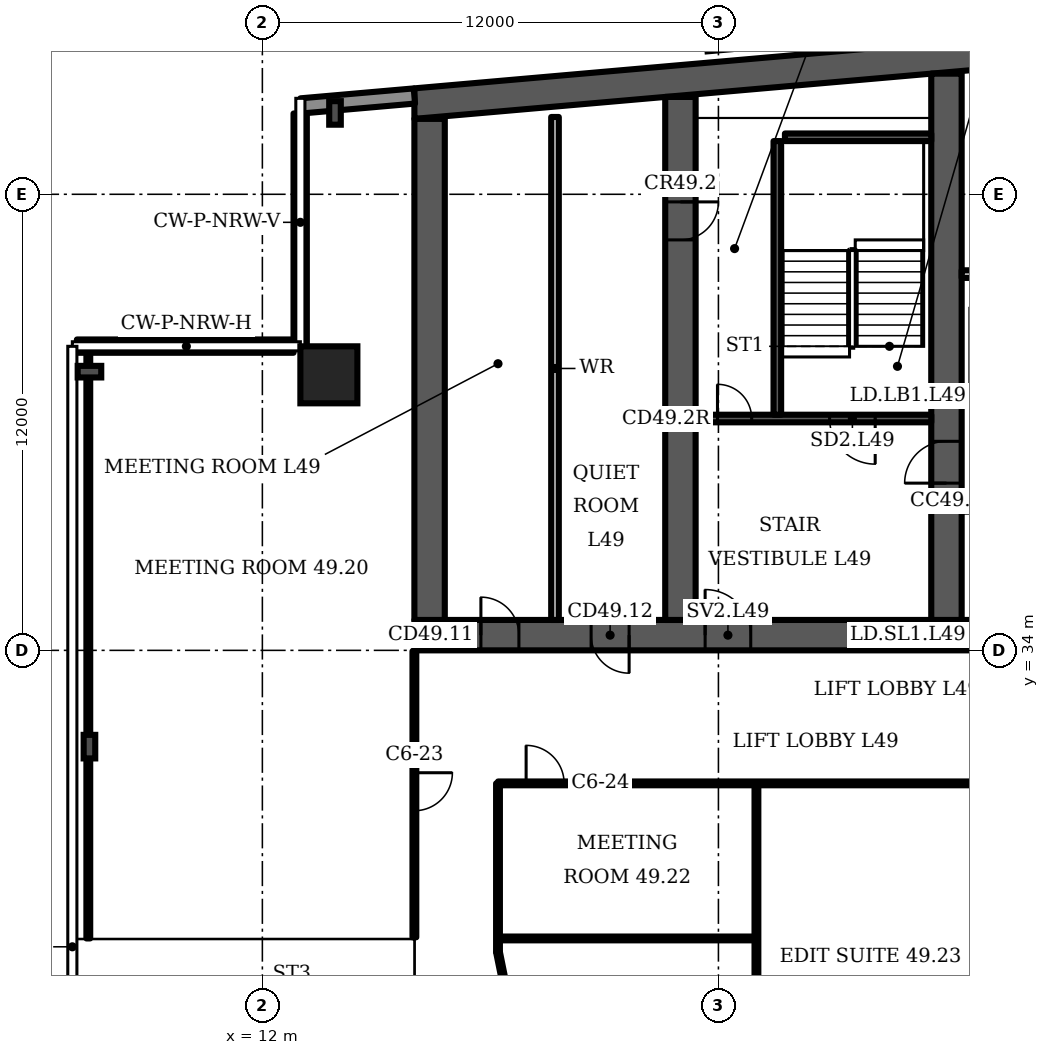
"""IFC4 building model, lengths in metres.
Left out: names, types, materials, properties, quantities, classifications, styles, units other than length and angle.
Written with IfcOpenShell. Run it as: python <this file> out.ifc"""

import sys

from ifc_helpers import new_model, si_unit, direction, frame, frame_2d, origin, origin_2d, place, context, subcontext, project, spatial, polyline, rectangle, i_section, outline, extrude, element, fill, save


model = new_model("IFC4")
c1 = context("Model", 3, precision=1e-05, world=origin(), true_north=direction((0.0, 1.0)))
c2 = subcontext(c1, "Body", "Model", "MODEL_VIEW")
j1 = project(units=[si_unit("LENGTHUNIT", "METRE"), si_unit("PLANEANGLEUNIT", "RADIAN")], contexts=[c1])
p1 = place(None, origin())
s1 = spatial("IfcSite", under=j1, at=p1, CompositionType="ELEMENT")
p2 = place(p1, origin())
s2 = spatial("IfcBuilding", under=s1, at=p2, CompositionType="ELEMENT")
p3 = place(p2, frame((0.0, 0.0, 198.7)))
s3 = spatial("IfcBuildingStorey", under=s2, at=p3, CompositionType="ELEMENT", Elevation=198.7)
p4 = place(p3, origin())
e1 = element("IfcWall", 1, at=p4, inside=s3, PredefinedType="SHEAR", context=c2, shape_type="SweptSolid", body=[
    extrude(outline(polyline([(16.0, 47.984), (37.0, 49.822), (58.0, 47.984), (58.0, 48.787), (37.0, 50.625), (16.0, 48.787), (16.0, 47.984)])), origin(), (0.0, 0.0, 1.0), 3.6),
])
p5 = place(p3, frame((16.0, 34.4, 0.0), z_axis=(0.0, 0.0, 1.0), x_axis=(1.0, 0.0, 0.0)))
e2 = element("IfcWall", 2, at=p5, inside=s3, PredefinedType="SHEAR", context=c2, shape_type="SweptSolid", body=[
    extrude(rectangle(XDim=42.0, YDim=0.8, at=frame_2d((21.0, 0.0))), origin(), (0.0, 0.0, 1.0), 3.6),
])
p6 = place(p5, frame((1.75, 0.0, 0.0)))
e3 = element("IfcOpeningElement", 3, at=p6, cuts=e2, PredefinedType="OPENING", context=c2, shape_type="SweptSolid", body=[
    extrude(rectangle(XDim=1.0, YDim=2.1, at=frame_2d((0.5, 1.05))), frame((0.0, 0.41, 0.0), z_axis=(0.0, -1.0, 0.0), x_axis=(1.0, 0.0, 0.0)), (0.0, 0.0, 1.0), 0.82),
])
p7 = place(p5, frame((4.65, 0.0, 0.0)))
e4 = element("IfcOpeningElement", 4, at=p7, cuts=e2, PredefinedType="OPENING", context=c2, shape_type="SweptSolid", body=[
    extrude(rectangle(XDim=1.0, YDim=2.1, at=frame_2d((0.5, 1.05))), frame((0.0, 0.41, 0.0), z_axis=(0.0, -1.0, 0.0), x_axis=(1.0, 0.0, 0.0)), (0.0, 0.0, 1.0), 0.82),
])
p8 = place(p5, frame((7.65, 0.0, 0.0)))
e5 = element("IfcOpeningElement", 5, at=p8, cuts=e2, PredefinedType="OPENING", context=c2, shape_type="SweptSolid", body=[
    extrude(rectangle(XDim=1.2, YDim=2.1, at=frame_2d((0.6, 1.05))), frame((0.0, 0.41, 0.0), z_axis=(0.0, -1.0, 0.0), x_axis=(1.0, 0.0, 0.0)), (0.0, 0.0, 1.0), 0.82),
])
p9 = place(p5, frame((14.767, 0.0, 0.0)))
e6 = element("IfcOpeningElement", 6, at=p9, cuts=e2, PredefinedType="OPENING", context=c2, shape_type="SweptSolid", body=[
    extrude(rectangle(XDim=1.1, YDim=2.1, at=frame_2d((0.55, 1.05))), frame((0.0, 0.41, 0.0), z_axis=(0.0, -1.0, 0.0), x_axis=(1.0, 0.0, 0.0)), (0.0, 0.0, 1.0), 0.82),
])
p10 = place(p5, frame((19.133, 0.0, 0.0)))
e7 = element("IfcOpeningElement", 7, at=p10, cuts=e2, PredefinedType="OPENING", context=c2, shape_type="SweptSolid", body=[
    extrude(rectangle(XDim=1.1, YDim=2.1, at=frame_2d((0.55, 1.05))), frame((0.0, 0.41, 0.0), z_axis=(0.0, -1.0, 0.0), x_axis=(1.0, 0.0, 0.0)), (0.0, 0.0, 1.0), 0.82),
])
p11 = place(p5, frame((16.8, 0.0, 0.0)))
e8 = element("IfcOpeningElement", 8, at=p11, cuts=e2, PredefinedType="OPENING", context=c2, shape_type="SweptSolid", body=[
    extrude(rectangle(XDim=1.4, YDim=2.1, at=frame_2d((0.7, 1.05))), frame((0.0, 0.41, 0.0), z_axis=(0.0, -1.0, 0.0), x_axis=(1.0, 0.0, 0.0)), (0.0, 0.0, 1.0), 0.82),
])
p12 = place(p5, frame((21.767, 0.0, 0.0)))
e9 = element("IfcOpeningElement", 9, at=p12, cuts=e2, PredefinedType="OPENING", context=c2, shape_type="SweptSolid", body=[
    extrude(rectangle(XDim=1.1, YDim=2.1, at=frame_2d((0.55, 1.05))), frame((0.0, 0.41, 0.0), z_axis=(0.0, -1.0, 0.0), x_axis=(1.0, 0.0, 0.0)), (0.0, 0.0, 1.0), 0.82),
])
p13 = place(p5, frame((23.95, 0.0, 0.0)))
e10 = element("IfcOpeningElement", 10, at=p13, cuts=e2, PredefinedType="OPENING", context=c2, shape_type="SweptSolid", body=[
    extrude(rectangle(XDim=1.1, YDim=2.1, at=frame_2d((0.55, 1.05))), frame((0.0, 0.41, 0.0), z_axis=(0.0, -1.0, 0.0), x_axis=(1.0, 0.0, 0.0)), (0.0, 0.0, 1.0), 0.82),
])
p14 = place(p5, frame((26.133, 0.0, 0.0)))
e11 = element("IfcOpeningElement", 11, at=p14, cuts=e2, PredefinedType="OPENING", context=c2, shape_type="SweptSolid", body=[
    extrude(rectangle(XDim=1.1, YDim=2.1, at=frame_2d((0.55, 1.05))), frame((0.0, 0.41, 0.0), z_axis=(0.0, -1.0, 0.0), x_axis=(1.0, 0.0, 0.0)), (0.0, 0.0, 1.0), 0.82),
])
p15 = place(p5, frame((33.15, 0.0, 0.0)))
e12 = element("IfcOpeningElement", 12, at=p15, cuts=e2, PredefinedType="OPENING", context=c2, shape_type="SweptSolid", body=[
    extrude(rectangle(XDim=1.2, YDim=2.1, at=frame_2d((0.6, 1.05))), frame((0.0, 0.41, 0.0), z_axis=(0.0, -1.0, 0.0), x_axis=(1.0, 0.0, 0.0)), (0.0, 0.0, 1.0), 0.82),
])
p16 = place(p5, frame((35.817, 0.0, 0.0)))
e13 = element("IfcOpeningElement", 13, at=p16, cuts=e2, PredefinedType="OPENING", context=c2, shape_type="SweptSolid", body=[
    extrude(rectangle(XDim=1.0, YDim=2.1, at=frame_2d((0.5, 1.05))), frame((0.0, 0.41, 0.0), z_axis=(0.0, -1.0, 0.0), x_axis=(1.0, 0.0, 0.0)), (0.0, 0.0, 1.0), 0.82),
])
p17 = place(p5, frame((39.95, 0.0, 0.0)))
e14 = element("IfcOpeningElement", 14, at=p17, cuts=e2, PredefinedType="OPENING", context=c2, shape_type="SweptSolid", body=[
    extrude(rectangle(XDim=1.0, YDim=2.1, at=frame_2d((0.5, 1.05))), frame((0.0, 0.41, 0.0), z_axis=(0.0, -1.0, 0.0), x_axis=(1.0, 0.0, 0.0)), (0.0, 0.0, 1.0), 0.82),
])
p18 = place(p5, frame((37.767, 0.0, 0.0)))
e15 = element("IfcOpeningElement", 15, at=p18, cuts=e2, PredefinedType="OPENING", context=c2, shape_type="SweptSolid", body=[
    extrude(rectangle(XDim=1.4, YDim=2.1, at=frame_2d((0.7, 1.05))), frame((0.0, 0.41, 0.0), z_axis=(0.0, -1.0, 0.0), x_axis=(1.0, 0.0, 0.0)), (0.0, 0.0, 1.0), 0.82),
])
p19 = place(p3, frame((16.4, 34.8, 0.0), z_axis=(0.0, 0.0, 1.0), x_axis=(0.0, 1.0, 0.0)))
e16 = element("IfcWall", 16, at=p19, inside=s3, PredefinedType="SHEAR", context=c2, shape_type="SweptSolid", body=[
    extrude(rectangle(XDim=13.184, YDim=0.8, at=frame_2d((6.592, 0.0))), origin(), (0.0, 0.0, 1.0), 3.6),
])
p20 = place(p3, frame((23.0, 34.8, 0.0), z_axis=(0.0, 0.0, 1.0), x_axis=(0.0, 1.0, 0.0)))
e17 = element("IfcWall", 17, at=p20, inside=s3, PredefinedType="SHEAR", context=c2, shape_type="SweptSolid", body=[
    extrude(rectangle(XDim=13.762, YDim=0.8, at=frame_2d((6.881, 0.0))), origin(), (0.0, 0.0, 1.0), 3.6),
])
p21 = place(p20, frame((10.0, 0.0, 0.0)))
e18 = element("IfcOpeningElement", 18, at=p21, cuts=e17, PredefinedType="OPENING", context=c2, shape_type="SweptSolid", body=[
    extrude(rectangle(XDim=1.0, YDim=2.1, at=frame_2d((0.5, 1.05))), frame((0.0, 0.41, 0.0), z_axis=(0.0, -1.0, 0.0), x_axis=(1.0, 0.0, 0.0)), (0.0, 0.0, 1.0), 0.82),
])
p22 = place(p3, frame((30.0, 34.8, 0.0), z_axis=(0.0, 0.0, 1.0), x_axis=(0.0, 1.0, 0.0)))
e19 = element("IfcWall", 19, at=p22, inside=s3, PredefinedType="SHEAR", context=c2, shape_type="SweptSolid", body=[
    extrude(rectangle(XDim=14.374, YDim=0.8, at=frame_2d((7.187, 0.0))), origin(), (0.0, 0.0, 1.0), 3.6),
])
p23 = place(p22, frame((3.6, 0.0, 0.0)))
e20 = element("IfcOpeningElement", 20, at=p23, cuts=e19, PredefinedType="OPENING", context=c2, shape_type="SweptSolid", body=[
    extrude(rectangle(XDim=1.1, YDim=2.1, at=frame_2d((0.55, 1.05))), frame((0.0, 0.41, 0.0), z_axis=(0.0, -1.0, 0.0), x_axis=(1.0, 0.0, 0.0)), (0.0, 0.0, 1.0), 0.82),
])
p24 = place(p3, frame((13.75, 41.25, 0.0), z_axis=(0.0, 0.0, 1.0), x_axis=(1.0, 0.0, 0.0)))
e21 = element("IfcColumn", 21, at=p24, inside=s3, PredefinedType="COLUMN", context=c2, shape_type="SweptSolid", body=[
    extrude(rectangle(XDim=1.5, YDim=1.5, at=origin_2d()), origin(), (0.0, 0.0, 1.0), 3.6),
])
for number, where, z_axis, x_axis in (
    (22, (13.911, 48.141, 0.0), (0.0, 0.0, 1.0), (-1.0, 0.0, 0.0)),
    (23, (7.45, 41.333, 0.0), (0.0, 0.0, 1.0), (0.0, 1.0, 0.0)),
    (24, (7.45, 31.467, 0.0), (0.0, 0.0, 1.0), (-1.0, 0.0, 0.0)),
):
    element("IfcColumn", number, at=place(p3, frame(where, z_axis=z_axis, x_axis=x_axis)), inside=s3, PredefinedType="COLUMN", context=c2, shape_type="SweptSolid", body=[
        extrude(i_section(OverallWidth=0.305, OverallDepth=0.62, WebThickness=0.021, FlangeThickness=0.04, FilletRadius=0.027, at=origin_2d()), origin(), (0.0, 0.0, 1.0), 3.6),
    ])
p25 = place(p3, frame((16.0, 48.587, 0.0), z_axis=(0.0, 0.0, 1.0), x_axis=(-0.996194, -0.087168, 0.0)))
e25 = element("IfcWall", 25, at=p25, inside=s3, PredefinedType="SOLIDWALL", context=c2, shape_type="SweptSolid", body=[
    extrude(rectangle(XDim=2.994, YDim=0.4, at=frame_2d((1.497, 0.0))), origin(), (0.0, 0.0, 1.0), 3.15),
])
p26 = place(p3, frame((12.995, 48.126, 0.0), z_axis=(0.0, 0.0, 1.0), x_axis=(0.0, -1.0, 0.0)))
e26 = element("IfcWall", 26, at=p26, inside=s3, PredefinedType="SOLIDWALL", context=c2, shape_type="SweptSolid", body=[
    extrude(rectangle(XDim=6.126, YDim=0.35, at=frame_2d((3.063, 0.0))), origin(), (0.0, 0.0, 1.0), 1.0),
])
p27 = place(p3, frame((12.82, 42.005, 0.0), z_axis=(0.0, 0.0, 1.0), x_axis=(-1.0, 0.0, 0.0)))
e27 = element("IfcWall", 27, at=p27, inside=s3, PredefinedType="SOLIDWALL", context=c2, shape_type="SweptSolid", body=[
    extrude(rectangle(XDim=5.7, YDim=0.35, at=frame_2d((2.85, 0.0))), origin(), (0.0, 0.0, 1.0), 1.0),
])
p28 = place(p3, frame((19.7, 34.8, 0.0), z_axis=(0.0, 0.0, 1.0), x_axis=(0.0, 1.0, 0.0)))
e28 = element("IfcWall", 28, at=p28, inside=s3, PredefinedType="PARTITIONING", context=c2, shape_type="SweptSolid", body=[
    extrude(rectangle(XDim=13.234, YDim=0.2, at=frame_2d((6.617, 0.0))), origin(), (0.0, 0.0, 1.0), 3.15),
])
p29 = place(p3, frame((23.4, 40.1, 0.0), z_axis=(0.0, 0.0, 1.0), x_axis=(1.0, 0.0, 0.0)))
e29 = element("IfcWall", 29, at=p29, inside=s3, PredefinedType="SHEAR", context=c2, shape_type="SweptSolid", body=[
    extrude(rectangle(XDim=6.2, YDim=0.2, at=frame_2d((3.1, 0.0))), origin(), (0.0, 0.0, 1.0), 3.15),
])
p30 = place(p29, frame((3.525, 0.0, 0.0)))
e30 = element("IfcOpeningElement", 30, at=p30, cuts=e29, PredefinedType="OPENING", context=c2, shape_type="SweptSolid", body=[
    extrude(rectangle(XDim=1.2, YDim=2.1, at=frame_2d((0.6, 1.05))), frame((0.0, 0.11, 0.0), z_axis=(0.0, -1.0, 0.0), x_axis=(1.0, 0.0, 0.0)), (0.0, 0.0, 1.0), 0.22),
])
p31 = place(p29, frame((0.575, 0.0, 0.0)))
e31 = element("IfcOpeningElement", 31, at=p31, cuts=e29, PredefinedType="OPENING", context=c2, shape_type="SweptSolid", body=[
    extrude(rectangle(XDim=0.9, YDim=2.1, at=frame_2d((0.45, 1.05))), frame((0.0, 0.11, 0.0), z_axis=(0.0, -1.0, 0.0), x_axis=(1.0, 0.0, 0.0)), (0.0, 0.0, 1.0), 0.22),
])
p32 = place(p3, frame((25.55, 40.2, 0.0), z_axis=(0.0, 0.0, 1.0), x_axis=(0.0, 1.0, 0.0)))
e32 = element("IfcWall", 32, at=p32, inside=s3, PredefinedType="SHEAR", context=c2, shape_type="SweptSolid", body=[
    extrude(rectangle(XDim=7.2, YDim=0.2, at=frame_2d((3.6, 0.0))), origin(), (0.0, 0.0, 1.0), 3.15),
])
p33 = place(p3, frame((25.75, 47.5, 0.0), z_axis=(0.0, 0.0, 1.0), x_axis=(1.0, 0.0, 0.0)))
e33 = element("IfcWall", 33, at=p33, inside=s3, PredefinedType="SHEAR", context=c2, shape_type="SweptSolid", body=[
    extrude(rectangle(XDim=3.85, YDim=0.2, at=frame_2d((1.925, 0.0))), origin(), (0.0, 0.0, 1.0), 3.15),
])
p34 = place(p3, frame((30.4, 40.7, 0.0), z_axis=(0.0, 0.0, 1.0), x_axis=(1.0, 0.0, 0.0)))
e34 = element("IfcWall", 34, at=p34, inside=s3, PredefinedType="PARTITIONING", context=c2, shape_type="SweptSolid", body=[
    extrude(rectangle(XDim=6.2, YDim=0.2, at=frame_2d((3.1, 0.0))), origin(), (0.0, 0.0, 1.0), 3.15),
])
p35 = place(p34, frame((0.367, 0.0, 0.0)))
e35 = element("IfcOpeningElement", 35, at=p35, cuts=e34, PredefinedType="OPENING", context=c2, shape_type="SweptSolid", body=[
    extrude(rectangle(XDim=1.1, YDim=2.1, at=frame_2d((0.55, 1.05))), frame((0.0, 0.11, 0.0), z_axis=(0.0, -1.0, 0.0), x_axis=(1.0, 0.0, 0.0)), (0.0, 0.0, 1.0), 0.22),
])
p36 = place(p34, frame((2.55, 0.0, 0.0)))
e36 = element("IfcOpeningElement", 36, at=p36, cuts=e34, PredefinedType="OPENING", context=c2, shape_type="SweptSolid", body=[
    extrude(rectangle(XDim=1.1, YDim=2.1, at=frame_2d((0.55, 1.05))), frame((0.0, 0.11, 0.0), z_axis=(0.0, -1.0, 0.0), x_axis=(1.0, 0.0, 0.0)), (0.0, 0.0, 1.0), 0.22),
])
p37 = place(p34, frame((4.733, 0.0, 0.0)))
e37 = element("IfcOpeningElement", 37, at=p37, cuts=e34, PredefinedType="OPENING", context=c2, shape_type="SweptSolid", body=[
    extrude(rectangle(XDim=1.1, YDim=2.1, at=frame_2d((0.55, 1.05))), frame((0.0, 0.11, 0.0), z_axis=(0.0, -1.0, 0.0), x_axis=(1.0, 0.0, 0.0)), (0.0, 0.0, 1.0), 0.22),
])
p38 = place(p3, origin())
e38 = element("IfcWall", 38, at=p38, inside=s3, PredefinedType="PARTITIONING", context=c2, shape_type="SweptSolid", body=[
    extrude(outline(polyline([(32.233, 37.65), (30.4, 37.65), (30.4, 37.85), (32.233, 37.85), (32.433, 37.85), (32.433, 34.8), (32.233, 34.8), (32.233, 37.65)])), origin(), (0.0, 0.0, 1.0), 3.15),
])
p39 = place(p3, origin())
e39 = element("IfcWall", 39, at=p39, inside=s3, PredefinedType="PARTITIONING", context=c2, shape_type="SweptSolid", body=[
    extrude(outline(polyline([(32.433, 40.8), (32.233, 40.8), (32.233, 43.8), (30.4, 43.8), (30.4, 44.0), (36.6, 44.0), (36.6, 43.8), (34.767, 43.8), (34.767, 40.8), (34.567, 40.8), (34.567, 43.8), (32.433, 43.8), (32.433, 40.8)])), origin(), (0.0, 0.0, 1.0), 3.15),
])
p40 = place(p3, frame((7.42, 26.42, 0.0), z_axis=(0.0, 0.0, 1.0), x_axis=(0.0, 1.0, 0.0)))
e40 = element("IfcWall", 40, at=p40, inside=s3, PredefinedType="PARTITIONING", context=c2, shape_type="SweptSolid", body=[
    extrude(rectangle(XDim=15.56, YDim=0.1, at=frame_2d((7.78, 0.0))), origin(), (0.0, 0.0, 1.0), 2.53),
])
p41 = place(p3, frame((16.0, 26.45, 0.0), z_axis=(0.0, 0.0, 1.0), x_axis=(0.0, 1.0, 0.0)))
e41 = element("IfcWall", 41, at=p41, inside=s3, PredefinedType="PARTITIONING", context=c2, shape_type="SweptSolid", body=[
    extrude(rectangle(XDim=7.53, YDim=0.1, at=frame_2d((3.765, 0.0))), origin(), (0.0, 0.0, 1.0), 3.15),
])
p42 = place(p41, frame((3.33, 0.0, 0.0)))
e42 = element("IfcOpeningElement", 42, at=p42, cuts=e41, PredefinedType="OPENING", context=c2, shape_type="SweptSolid", body=[
    extrude(rectangle(XDim=1.0, YDim=2.1, at=frame_2d((0.5, 1.05))), frame((0.0, 0.06, 0.0), z_axis=(0.0, -1.0, 0.0), x_axis=(1.0, 0.0, 0.0)), (0.0, 0.0, 1.0), 0.12),
])
p43 = place(p3, frame((18.2, 26.06, 0.0), z_axis=(0.0, 0.0, 1.0), x_axis=(0.0, 1.0, 0.0)))
e43 = element("IfcWall", 43, at=p43, inside=s3, PredefinedType="PARTITIONING", context=c2, shape_type="SweptSolid", body=[
    extrude(rectangle(XDim=4.44, YDim=0.1, at=frame_2d((2.22, 0.0))), origin(), (0.0, 0.0, 1.0), 3.15),
])
p44 = place(p3, frame((18.2, 26.42, 0.0), z_axis=(0.0, 0.0, 1.0), x_axis=(1.0, 0.0, 0.0)))
e44 = element("IfcWall", 44, at=p44, inside=s3, PredefinedType="PARTITIONING", context=c2, shape_type="SweptSolid", body=[
    extrude(rectangle(XDim=6.8, YDim=0.1, at=frame_2d((3.4, 0.0))), origin(), (0.0, 0.0, 1.0), 3.15),
])
p45 = place(p3, frame((18.2, 30.5, 0.0), z_axis=(0.0, 0.0, 1.0), x_axis=(1.0, 0.0, 0.0)))
e45 = element("IfcWall", 45, at=p45, inside=s3, PredefinedType="PARTITIONING", context=c2, shape_type="SweptSolid", body=[
    extrude(rectangle(XDim=18.65, YDim=0.1, at=frame_2d((9.325, 0.0))), origin(), (0.0, 0.0, 1.0), 3.15),
])
p46 = place(p45, frame((0.74, 0.0, 0.0)))
e46 = element("IfcOpeningElement", 46, at=p46, cuts=e45, PredefinedType="OPENING", context=c2, shape_type="SweptSolid", body=[
    extrude(rectangle(XDim=1.0, YDim=2.1, at=frame_2d((0.5, 1.05))), frame((0.0, 0.06, 0.0), z_axis=(0.0, -1.0, 0.0), x_axis=(1.0, 0.0, 0.0)), (0.0, 0.0, 1.0), 0.12),
])
p47 = place(p3, frame((18.955, 22.34, 0.0), z_axis=(0.0, 0.0, 1.0), x_axis=(-0.198935, 0.980011, 0.0)))
e47 = element("IfcWall", 47, at=p47, inside=s3, PredefinedType="PARTITIONING", context=c2, shape_type="SweptSolid", body=[
    extrude(rectangle(XDim=3.796, YDim=0.1, at=frame_2d((1.898, 0.0))), origin(), (0.0, 0.0, 1.0), 3.15),
])
p48 = place(p3, frame((25.0, 22.34, 0.0), z_axis=(0.0, 0.0, 1.0), x_axis=(0.0, 1.0, 0.0)))
e48 = element("IfcWall", 48, at=p48, inside=s3, PredefinedType="PARTITIONING", context=c2, shape_type="SweptSolid", body=[
    extrude(rectangle(XDim=8.16, YDim=0.1, at=frame_2d((4.08, 0.0))), origin(), (0.0, 0.0, 1.0), 3.15),
])
p49 = place(p6, origin())
e49 = element("IfcDoor", 49, at=p49, inside=s3, OperationType="SINGLE_SWING_LEFT", PredefinedType="DOOR", context=c2, shape_type="SweptSolid", body=[
    extrude(rectangle(XDim=1.0, YDim=2.1, at=frame_2d((0.5, 1.05))), frame((0.0, 0.4, 0.0), z_axis=(0.0, -1.0, 0.0), x_axis=(1.0, 0.0, 0.0)), (0.0, 0.0, 1.0), 0.8),
])
fill(e3, e49)
p50 = place(p7, origin())
e50 = element("IfcDoor", 50, at=p50, inside=s3, OperationType="SINGLE_SWING_RIGHT", PredefinedType="DOOR", context=c2, shape_type="SweptSolid", body=[
    extrude(rectangle(XDim=1.0, YDim=2.1, at=frame_2d((0.5, 1.05))), frame((0.0, 0.4, 0.0), z_axis=(0.0, -1.0, 0.0), x_axis=(1.0, 0.0, 0.0)), (0.0, 0.0, 1.0), 0.8),
])
fill(e4, e50)
p51 = place(p30, origin())
e51 = element("IfcDoor", 51, at=p51, inside=s3, OperationType="SINGLE_SWING_RIGHT", PredefinedType="DOOR", context=c2, shape_type="SweptSolid", body=[
    extrude(rectangle(XDim=1.2, YDim=2.1, at=frame_2d((0.6, 1.05))), frame((0.0, 0.025, 0.0), z_axis=(0.0, -1.0, 0.0), x_axis=(1.0, 0.0, 0.0)), (0.0, 0.0, 1.0), 0.05),
])
fill(e30, e51)
p52 = place(p31, origin())
e52 = element("IfcDoor", 52, at=p52, inside=s3, OperationType="SINGLE_SWING_LEFT", PredefinedType="DOOR", context=c2, shape_type="SweptSolid", body=[
    extrude(rectangle(XDim=0.9, YDim=2.1, at=frame_2d((0.45, 1.05))), frame((0.0, 0.025, 0.0), z_axis=(0.0, -1.0, 0.0), x_axis=(1.0, 0.0, 0.0)), (0.0, 0.0, 1.0), 0.05),
])
fill(e31, e52)
p53 = place(p8, origin())
e53 = element("IfcDoor", 53, at=p53, inside=s3, OperationType="SINGLE_SWING_LEFT", PredefinedType="DOOR", context=c2, shape_type="SweptSolid", body=[
    extrude(rectangle(XDim=1.2, YDim=2.1, at=frame_2d((0.6, 1.05))), frame((0.0, 0.025, 0.0), z_axis=(0.0, -1.0, 0.0), x_axis=(1.0, 0.0, 0.0)), (0.0, 0.0, 1.0), 0.05),
])
fill(e5, e53)
p54 = place(p21, origin())
e54 = element("IfcDoor", 54, at=p54, inside=s3, OperationType="SINGLE_SWING_RIGHT", PredefinedType="DOOR", context=c2, shape_type="SweptSolid", body=[
    extrude(rectangle(XDim=1.0, YDim=2.1, at=frame_2d((0.5, 1.05))), frame((0.0, 0.4, 0.0), z_axis=(0.0, -1.0, 0.0), x_axis=(1.0, 0.0, 0.0)), (0.0, 0.0, 1.0), 0.8),
])
fill(e18, e54)
p55 = place(p23, origin())
e55 = element("IfcDoor", 55, at=p55, inside=s3, OperationType="SINGLE_SWING_LEFT", PredefinedType="DOOR", context=c2, shape_type="SweptSolid", body=[
    extrude(rectangle(XDim=1.1, YDim=2.1, at=frame_2d((0.55, 1.05))), frame((0.0, 0.025, 0.0), z_axis=(0.0, -1.0, 0.0), x_axis=(1.0, 0.0, 0.0)), (0.0, 0.0, 1.0), 0.05),
])
fill(e20, e55)
p56 = place(p42, origin())
e56 = element("IfcDoor", 56, at=p56, inside=s3, OperationType="SINGLE_SWING_RIGHT", PredefinedType="DOOR", context=c2, shape_type="SweptSolid", body=[
    extrude(rectangle(XDim=1.0, YDim=2.1, at=frame_2d((0.5, 1.05))), frame((0.0, 0.025, 0.0), z_axis=(0.0, -1.0, 0.0), x_axis=(1.0, 0.0, 0.0)), (0.0, 0.0, 1.0), 0.05),
])
fill(e42, e56)
p57 = place(p46, origin())
e57 = element("IfcDoor", 57, at=p57, inside=s3, OperationType="SINGLE_SWING_LEFT", PredefinedType="DOOR", context=c2, shape_type="SweptSolid", body=[
    extrude(rectangle(XDim=1.0, YDim=2.1, at=frame_2d((0.5, 1.05))), frame((0.0, 0.025, 0.0), z_axis=(0.0, -1.0, 0.0), x_axis=(1.0, 0.0, 0.0)), (0.0, 0.0, 1.0), 0.05),
])
fill(e46, e57)
save(model, sys.argv[1])
